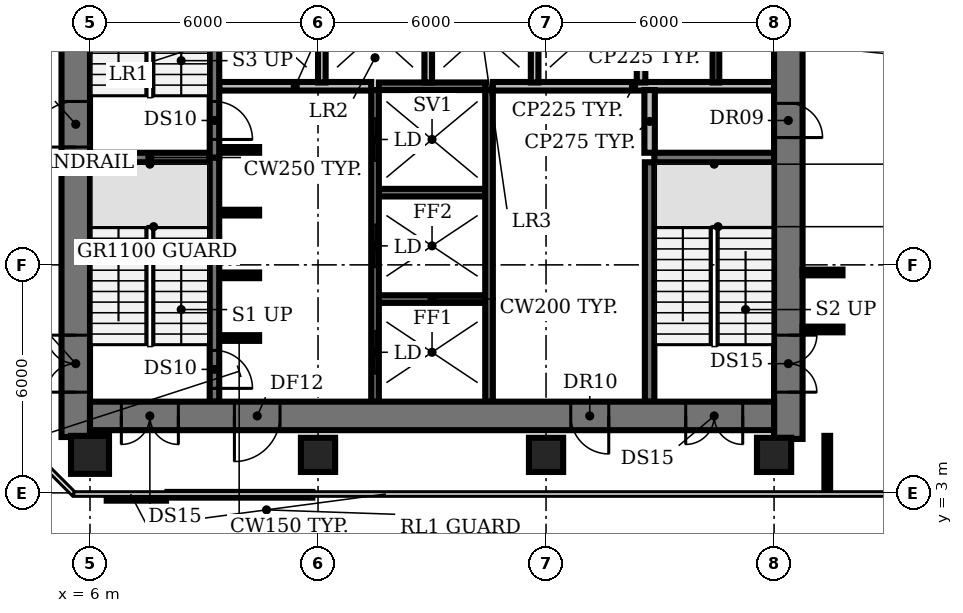
"""IFC4 building model, lengths in metres.
Left out: names, types, materials, properties, quantities, classifications, styles, units other than length and angle.
Written with IfcOpenShell. Run it as: python <this file> out.ifc"""

import sys

from ifc_helpers import new_model, si_unit, direction, frame, frame_2d, origin, origin_2d, place, context, subcontext, project, spatial, rectangle, circle, extrude, element, fill, save


model = new_model("IFC4")
c1 = context("Model", 3, precision=1e-05, world=origin(), true_north=direction((0.0, 1.0)))
c2 = subcontext(c1, "Body", "Model", "MODEL_VIEW")
j1 = project(units=[si_unit("LENGTHUNIT", "METRE"), si_unit("PLANEANGLEUNIT", "RADIAN")], contexts=[c1])
p1 = place(None, origin())
s1 = spatial("IfcSite", under=j1, at=p1, CompositionType="ELEMENT")
p2 = place(p1, origin())
s2 = spatial("IfcBuilding", under=s1, at=p2, CompositionType="ELEMENT")
p3 = place(p2, frame((0.0, 0.0, 96.2)))
s3 = spatial("IfcBuildingStorey", under=s2, at=p3, CompositionType="ELEMENT", Elevation=96.2)
p4 = place(p3, frame((6.0, 4.0, 0.0), z_axis=(0.0, 0.0, 1.0), x_axis=(1.0, 0.0, 0.0)))
e1 = element("IfcColumn", 1, at=p4, inside=s3, PredefinedType="COLUMN", context=c2, shape_type="SweptSolid", body=[
    extrude(circle(Radius=0.5, at=origin_2d()), origin(), (0.0, 0.0, 1.0), 3.85),
])
for number, where, z_axis, x_axis in (
    (2, (12.0, 4.0, 0.0), (0.0, 0.0, 1.0), (1.0, 0.0, 0.0)),
    (3, (18.0, 4.0, 0.0), (0.0, 0.0, 1.0), (1.0, 0.0, 0.0)),
    (4, (24.0, 4.0, 0.0), (0.0, 0.0, 1.0), (1.0, 0.0, 0.0)),
):
    element("IfcColumn", number, at=place(p3, frame(where, z_axis=z_axis, x_axis=x_axis)), inside=s3, PredefinedType="COLUMN", context=c2, shape_type="SweptSolid", body=[
        extrude(rectangle(XDim=0.9, YDim=0.9, at=origin_2d()), origin(), (0.0, 0.0, 1.0), 3.85),
    ])
p5 = place(p3, frame((9.4, 7.075, 0.0), z_axis=(0.0, 0.0, 1.0), x_axis=(1.0, 0.0, 0.0)))
e5 = element("IfcWall", 5, at=p5, inside=s3, PredefinedType="SHEAR", context=c2, shape_type="SweptSolid", body=[
    extrude(rectangle(XDim=1.05, YDim=0.15, at=frame_2d((0.525, 0.0))), origin(), (0.0, 0.0, 1.0), 3.85),
])
p6 = place(p3, frame((13.6, 8.1, 0.0), z_axis=(0.0, 0.0, 1.0), x_axis=(1.0, 0.0, 0.0)))
e6 = element("IfcWall", 6, at=p6, inside=s3, PredefinedType="SHEAR", context=c2, shape_type="SweptSolid", body=[
    extrude(rectangle(XDim=2.8, YDim=0.2, at=frame_2d((1.4, 0.0))), origin(), (0.0, 0.0, 1.0), 3.85),
])
for number, where, z_axis, x_axis in (
    (7, (9.4, 8.725, 0.0), (0.0, 0.0, 1.0), (1.0, 0.0, 0.0)),
    (8, (9.4, 10.375, 0.0), (0.0, 0.0, 1.0), (1.0, 0.0, 0.0)),
):
    element("IfcWall", number, at=place(p3, frame(where, z_axis=z_axis, x_axis=x_axis)), inside=s3, PredefinedType="SHEAR", context=c2, shape_type="SweptSolid", body=[
        extrude(rectangle(XDim=1.05, YDim=0.15, at=frame_2d((0.525, 0.0))), origin(), (0.0, 0.0, 1.0), 3.85),
    ])
p7 = place(p3, frame((13.6, 10.9, 0.0), z_axis=(0.0, 0.0, 1.0), x_axis=(1.0, 0.0, 0.0)))
e9 = element("IfcWall", 9, at=p7, inside=s3, PredefinedType="SHEAR", context=c2, shape_type="SweptSolid", body=[
    extrude(rectangle(XDim=2.8, YDim=0.2, at=frame_2d((1.4, 0.0))), origin(), (0.0, 0.0, 1.0), 3.85),
])
for number, where, z_axis, x_axis in (
    (10, (6.0, 11.825, 0.0), (0.0, 0.0, 1.0), (1.0, 0.0, 0.0)),
    (11, (20.85, 11.825, 0.0), (0.0, 0.0, 1.0), (1.0, 0.0, 0.0)),
):
    element("IfcWall", number, at=place(p3, frame(where, z_axis=z_axis, x_axis=x_axis)), inside=s3, PredefinedType="SHEAR", context=c2, shape_type="SweptSolid", body=[
        extrude(rectangle(XDim=3.15, YDim=0.25, at=frame_2d((1.575, 0.0))), origin(), (0.0, 0.0, 1.0), 3.85),
    ])
p8 = place(p3, frame((9.4, 12.025, 0.0), z_axis=(0.0, 0.0, 1.0), x_axis=(1.0, 0.0, 0.0)))
e12 = element("IfcWall", 12, at=p8, inside=s3, PredefinedType="SHEAR", context=c2, shape_type="SweptSolid", body=[
    extrude(rectangle(XDim=1.05, YDim=0.15, at=frame_2d((0.525, 0.0))), origin(), (0.0, 0.0, 1.0), 3.85),
])
p9 = place(p3, frame((9.4, 13.7, 0.0), z_axis=(0.0, 0.0, 1.0), x_axis=(1.0, 0.0, 0.0)))
e13 = element("IfcWall", 13, at=p9, inside=s3, PredefinedType="PARTITIONING", context=c2, shape_type="SweptSolid", body=[
    extrude(rectangle(XDim=4.0, YDim=0.225, at=frame_2d((2.0, 0.0))), origin(), (0.0, 0.0, 1.0), 3.85),
])
p10 = place(p3, frame((13.6, 13.7, 0.0), z_axis=(0.0, 0.0, 1.0), x_axis=(1.0, 0.0, 0.0)))
e14 = element("IfcWall", 14, at=p10, inside=s3, PredefinedType="SHEAR", context=c2, shape_type="SweptSolid", body=[
    extrude(rectangle(XDim=2.8, YDim=0.2, at=frame_2d((1.4, 0.0))), origin(), (0.0, 0.0, 1.0), 3.85),
])
p11 = place(p3, frame((16.6, 13.7, 0.0), z_axis=(0.0, 0.0, 1.0), x_axis=(1.0, 0.0, 0.0)))
e15 = element("IfcWall", 15, at=p11, inside=s3, PredefinedType="PARTITIONING", context=c2, shape_type="SweptSolid", body=[
    extrude(rectangle(XDim=7.4, YDim=0.225, at=frame_2d((3.7, 0.0))), origin(), (0.0, 0.0, 1.0), 3.85),
])
p12 = place(p3, frame((9.275, 11.825, 0.0), z_axis=(0.0, 0.0, 1.0), x_axis=(0.0, -1.0, 0.0)))
e16 = element("IfcWall", 16, at=p12, inside=s3, PredefinedType="SHEAR", context=c2, shape_type="SweptSolid", body=[
    extrude(rectangle(XDim=6.425, YDim=0.25, at=frame_2d((3.212, 0.0))), origin(), (0.0, 0.0, 1.0), 3.85),
])
p13 = place(p12, frame((5.075, 0.0, 0.0)))
e17 = element("IfcOpeningElement", 17, at=p13, cuts=e16, PredefinedType="OPENING", context=c2, shape_type="SweptSolid", body=[
    extrude(rectangle(XDim=1.0, YDim=2.1, at=frame_2d((0.5, 1.05))), frame((0.0, 0.135, 0.0), z_axis=(0.0, -1.0, 0.0), x_axis=(1.0, 0.0, 0.0)), (0.0, 0.0, 1.0), 0.27),
])
p14 = place(p3, frame((9.275, 18.375, 0.0), z_axis=(0.0, 0.0, 1.0), x_axis=(0.0, -1.0, 0.0)))
e18 = element("IfcWall", 18, at=p14, inside=s3, PredefinedType="SHEAR", context=c2, shape_type="SweptSolid", body=[
    extrude(rectangle(XDim=6.55, YDim=0.25, at=frame_2d((3.275, 0.0))), origin(), (0.0, 0.0, 1.0), 3.85),
])
p15 = place(p14, frame((5.075, 0.0, 0.0)))
e19 = element("IfcOpeningElement", 19, at=p15, cuts=e18, PredefinedType="OPENING", context=c2, shape_type="SweptSolid", body=[
    extrude(rectangle(XDim=1.0, YDim=2.1, at=frame_2d((0.5, 1.05))), frame((0.0, 0.135, 0.0), z_axis=(0.0, -1.0, 0.0), x_axis=(1.0, 0.0, 0.0)), (0.0, 0.0, 1.0), 0.27),
])
p16 = place(p3, frame((12.1, 13.8, 0.0), z_axis=(0.0, 0.0, 1.0), x_axis=(0.0, 1.0, 0.0)))
e20 = element("IfcWall", 20, at=p16, inside=s3, PredefinedType="SOLIDWALL", context=c2, shape_type="SweptSolid", body=[
    extrude(rectangle(XDim=2.6, YDim=0.2, at=frame_2d((1.3, 0.0))), origin(), (0.0, 0.0, 1.0), 3.85),
])
p17 = place(p3, frame((13.5, 5.4, 0.0), z_axis=(0.0, 0.0, 1.0), x_axis=(0.0, 1.0, 0.0)))
e21 = element("IfcWall", 21, at=p17, inside=s3, PredefinedType="SHEAR", context=c2, shape_type="SweptSolid", body=[
    extrude(rectangle(XDim=8.2, YDim=0.2, at=frame_2d((4.1, 0.0))), origin(), (0.0, 0.0, 1.0), 3.85),
])
p18 = place(p17, frame((0.75, 0.0, 0.0)))
e22 = element("IfcOpeningElement", 22, at=p18, cuts=e21, PredefinedType="OPENING", context=c2, shape_type="SweptSolid", body=[
    extrude(rectangle(XDim=1.1, YDim=2.1, at=frame_2d((0.55, 1.05))), frame((0.0, 0.11, 0.0), z_axis=(0.0, -1.0, 0.0), x_axis=(1.0, 0.0, 0.0)), (0.0, 0.0, 1.0), 0.22),
])
p19 = place(p17, frame((3.55, 0.0, 0.0)))
e23 = element("IfcOpeningElement", 23, at=p19, cuts=e21, PredefinedType="OPENING", context=c2, shape_type="SweptSolid", body=[
    extrude(rectangle(XDim=1.1, YDim=2.1, at=frame_2d((0.55, 1.05))), frame((0.0, 0.11, 0.0), z_axis=(0.0, -1.0, 0.0), x_axis=(1.0, 0.0, 0.0)), (0.0, 0.0, 1.0), 0.22),
])
p20 = place(p17, frame((6.35, 0.0, 0.0)))
e24 = element("IfcOpeningElement", 24, at=p20, cuts=e21, PredefinedType="OPENING", context=c2, shape_type="SweptSolid", body=[
    extrude(rectangle(XDim=1.1, YDim=2.1, at=frame_2d((0.55, 1.05))), frame((0.0, 0.11, 0.0), z_axis=(0.0, -1.0, 0.0), x_axis=(1.0, 0.0, 0.0)), (0.0, 0.0, 1.0), 0.22),
])
p21 = place(p3, frame((14.9, 13.8, 0.0), z_axis=(0.0, 0.0, 1.0), x_axis=(0.0, 1.0, 0.0)))
e25 = element("IfcWall", 25, at=p21, inside=s3, PredefinedType="SOLIDWALL", context=c2, shape_type="SweptSolid", body=[
    extrude(rectangle(XDim=2.6, YDim=0.2, at=frame_2d((1.3, 0.0))), origin(), (0.0, 0.0, 1.0), 3.85),
])
p22 = place(p3, frame((16.5, 5.4, 0.0), z_axis=(0.0, 0.0, 1.0), x_axis=(0.0, 1.0, 0.0)))
e26 = element("IfcWall", 26, at=p22, inside=s3, PredefinedType="SHEAR", context=c2, shape_type="SweptSolid", body=[
    extrude(rectangle(XDim=8.2, YDim=0.2, at=frame_2d((4.1, 0.0))), origin(), (0.0, 0.0, 1.0), 3.85),
])
p23 = place(p3, frame((17.7, 13.8, 0.0), z_axis=(0.0, 0.0, 1.0), x_axis=(0.0, 1.0, 0.0)))
e27 = element("IfcWall", 27, at=p23, inside=s3, PredefinedType="SOLIDWALL", context=c2, shape_type="SweptSolid", body=[
    extrude(rectangle(XDim=2.6, YDim=0.2, at=frame_2d((1.3, 0.0))), origin(), (0.0, 0.0, 1.0), 3.85),
])
p24 = place(p3, frame((20.5, 13.8, 0.0), z_axis=(0.0, 0.0, 1.0), x_axis=(0.0, 1.0, 0.0)))
e28 = element("IfcWall", 28, at=p24, inside=s3, PredefinedType="PARTITIONING", context=c2, shape_type="SweptSolid", body=[
    extrude(rectangle(XDim=2.6, YDim=0.225, at=frame_2d((1.3, 0.0))), origin(), (0.0, 0.0, 1.0), 3.85),
])
p25 = place(p3, frame((20.725, 5.4, 0.0), z_axis=(0.0, 0.0, 1.0), x_axis=(0.0, 1.0, 0.0)))
e29 = element("IfcWall", 29, at=p25, inside=s3, PredefinedType="SHEAR", context=c2, shape_type="SweptSolid", body=[
    extrude(rectangle(XDim=6.3, YDim=0.25, at=frame_2d((3.15, 0.0))), origin(), (0.0, 0.0, 1.0), 3.85),
])
p26 = place(p3, frame((20.725, 11.95, 0.0), z_axis=(0.0, 0.0, 1.0), x_axis=(0.0, 1.0, 0.0)))
e30 = element("IfcWall", 30, at=p26, inside=s3, PredefinedType="PARTITIONING", context=c2, shape_type="SweptSolid", body=[
    extrude(rectangle(XDim=1.65, YDim=0.275, at=frame_2d((0.825, 0.0))), origin(), (0.0, 0.0, 1.0), 3.85),
])
p27 = place(p3, frame((22.47, 13.8, 0.0), z_axis=(0.0, 0.0, 1.0), x_axis=(0.0, 1.0, 0.0)))
e31 = element("IfcWall", 31, at=p27, inside=s3, PredefinedType="PARTITIONING", context=c2, shape_type="SweptSolid", body=[
    extrude(rectangle(XDim=2.6, YDim=0.175, at=frame_2d((1.3, 0.0))), origin(), (0.0, 0.0, 1.0), 3.85),
])
p28 = place(p3, frame((5.625, 4.47, 0.0), z_axis=(0.0, 0.0, 1.0), x_axis=(0.0, 1.0, 0.0)))
e32 = element("IfcWall", 32, at=p28, inside=s3, PredefinedType="SHEAR", context=c2, shape_type="SweptSolid", body=[
    extrude(rectangle(XDim=21.08, YDim=0.75, at=frame_2d((10.54, 0.0))), origin(), (0.0, 0.0, 1.0), 3.85),
])
p29 = place(p28, frame((1.18, 0.0, 0.0)))
e33 = element("IfcOpeningElement", 33, at=p29, cuts=e32, PredefinedType="OPENING", context=c2, shape_type="SweptSolid", body=[
    extrude(rectangle(XDim=1.5, YDim=2.1, at=frame_2d((0.75, 1.05))), frame((0.0, 0.385, 0.0), z_axis=(0.0, -1.0, 0.0), x_axis=(1.0, 0.0, 0.0)), (0.0, 0.0, 1.0), 0.77),
])
p30 = place(p28, frame((7.63, 0.0, 0.0)))
e34 = element("IfcOpeningElement", 34, at=p30, cuts=e32, PredefinedType="OPENING", context=c2, shape_type="SweptSolid", body=[
    extrude(rectangle(XDim=1.2, YDim=2.1, at=frame_2d((0.6, 1.05))), frame((0.0, 0.385, 0.0), z_axis=(0.0, -1.0, 0.0), x_axis=(1.0, 0.0, 0.0)), (0.0, 0.0, 1.0), 0.77),
])
p31 = place(p28, frame((14.18, 0.0, 0.0)))
e35 = element("IfcOpeningElement", 35, at=p31, cuts=e32, PredefinedType="OPENING", context=c2, shape_type="SweptSolid", body=[
    extrude(rectangle(XDim=1.2, YDim=2.1, at=frame_2d((0.6, 1.05))), frame((0.0, 0.385, 0.0), z_axis=(0.0, -1.0, 0.0), x_axis=(1.0, 0.0, 0.0)), (0.0, 0.0, 1.0), 0.77),
])
p32 = place(p3, frame((24.375, 25.55, 0.0), z_axis=(0.0, 0.0, 1.0), x_axis=(0.0, -1.0, 0.0)))
e36 = element("IfcWall", 36, at=p32, inside=s3, PredefinedType="SHEAR", context=c2, shape_type="SweptSolid", body=[
    extrude(rectangle(XDim=21.13, YDim=0.75, at=frame_2d((10.565, 0.0))), origin(), (0.0, 0.0, 1.0), 3.85),
])
p33 = place(p32, frame((18.4, 0.0, 0.0)))
e37 = element("IfcOpeningElement", 37, at=p33, cuts=e36, PredefinedType="OPENING", context=c2, shape_type="SweptSolid", body=[
    extrude(rectangle(XDim=1.5, YDim=2.1, at=frame_2d((0.75, 1.05))), frame((0.0, 0.385, 0.0), z_axis=(0.0, -1.0, 0.0), x_axis=(1.0, 0.0, 0.0)), (0.0, 0.0, 1.0), 0.77),
])
p34 = place(p32, frame((12.3, 0.0, 0.0)))
e38 = element("IfcOpeningElement", 38, at=p34, cuts=e36, PredefinedType="OPENING", context=c2, shape_type="SweptSolid", body=[
    extrude(rectangle(XDim=0.9, YDim=2.1, at=frame_2d((0.45, 1.05))), frame((0.0, 0.385, 0.0), z_axis=(0.0, -1.0, 0.0), x_axis=(1.0, 0.0, 0.0)), (0.0, 0.0, 1.0), 0.77),
])
p35 = place(p32, frame((6.3, 0.0, 0.0)))
e39 = element("IfcOpeningElement", 39, at=p35, cuts=e36, PredefinedType="OPENING", context=c2, shape_type="SweptSolid", body=[
    extrude(rectangle(XDim=2.0, YDim=2.1, at=frame_2d((1.0, 1.05))), frame((0.0, 0.385, 0.0), z_axis=(0.0, -1.0, 0.0), x_axis=(1.0, 0.0, 0.0)), (0.0, 0.0, 1.0), 0.77),
])
p36 = place(p3, frame((24.0, 5.025, 0.0), z_axis=(0.0, 0.0, 1.0), x_axis=(-1.0, 0.0, 0.0)))
e40 = element("IfcWall", 40, at=p36, inside=s3, PredefinedType="SHEAR", context=c2, shape_type="SweptSolid", body=[
    extrude(rectangle(XDim=18.0, YDim=0.75, at=frame_2d((9.0, 0.0))), origin(), (0.0, 0.0, 1.0), 3.85),
])
p37 = place(p36, frame((0.825, 0.0, 0.0)))
e41 = element("IfcOpeningElement", 41, at=p37, cuts=e40, PredefinedType="OPENING", context=c2, shape_type="SweptSolid", body=[
    extrude(rectangle(XDim=1.5, YDim=2.1, at=frame_2d((0.75, 1.05))), frame((0.0, 0.385, 0.0), z_axis=(0.0, -1.0, 0.0), x_axis=(1.0, 0.0, 0.0)), (0.0, 0.0, 1.0), 0.77),
])
p38 = place(p36, frame((15.675, 0.0, 0.0)))
e42 = element("IfcOpeningElement", 42, at=p38, cuts=e40, PredefinedType="OPENING", context=c2, shape_type="SweptSolid", body=[
    extrude(rectangle(XDim=1.5, YDim=2.1, at=frame_2d((0.75, 1.05))), frame((0.0, 0.385, 0.0), z_axis=(0.0, -1.0, 0.0), x_axis=(1.0, 0.0, 0.0)), (0.0, 0.0, 1.0), 0.77),
])
p39 = place(p36, frame((13.0, 0.0, 0.0)))
e43 = element("IfcOpeningElement", 43, at=p39, cuts=e40, PredefinedType="OPENING", context=c2, shape_type="SweptSolid", body=[
    extrude(rectangle(XDim=1.2, YDim=2.1, at=frame_2d((0.6, 1.05))), frame((0.0, 0.385, 0.0), z_axis=(0.0, -1.0, 0.0), x_axis=(1.0, 0.0, 0.0)), (0.0, 0.0, 1.0), 0.77),
])
p40 = place(p36, frame((4.35, 0.0, 0.0)))
e44 = element("IfcOpeningElement", 44, at=p40, cuts=e40, PredefinedType="OPENING", context=c2, shape_type="SweptSolid", body=[
    extrude(rectangle(XDim=1.0, YDim=2.1, at=frame_2d((0.5, 1.05))), frame((0.0, 0.385, 0.0), z_axis=(0.0, -1.0, 0.0), x_axis=(1.0, 0.0, 0.0)), (0.0, 0.0, 1.0), 0.77),
])
p41 = place(p3, frame((6.44, 2.87, 0.0), z_axis=(0.0, 0.0, 1.0), x_axis=(1.0, 0.0, 0.0)))
e45 = element("IfcWall", 45, at=p41, inside=s3, PredefinedType="PARTITIONING", context=c2, shape_type="SweptSolid", body=[
    extrude(rectangle(XDim=1.56, YDim=0.15, at=frame_2d((0.78, 0.0))), origin(), (0.0, 0.0, 1.0), 2.83),
])
p42 = place(p3, frame((8.04, 2.95, 0.0), z_axis=(0.0, 0.0, 1.0), x_axis=(1.0, 0.0, 0.0)))
e46 = element("IfcWall", 46, at=p42, inside=s3, PredefinedType="PARTITIONING", context=c2, shape_type="SweptSolid", body=[
    extrude(rectangle(XDim=3.81, YDim=0.15, at=frame_2d((1.905, 0.0))), origin(), (0.0, 0.0, 1.0), 2.83),
])
for number, where, z_axis, x_axis in (
    (47, (24.75, 7.3, 0.0), (0.0, 0.0, 1.0), (1.0, 0.0, 0.0)),
    (48, (24.75, 8.8, 0.0), (0.0, 0.0, 1.0), (1.0, 0.0, 0.0)),
):
    element("IfcWall", number, at=place(p3, frame(where, z_axis=z_axis, x_axis=x_axis)), inside=s3, PredefinedType="PARTITIONING", context=c2, shape_type="SweptSolid", body=[
        extrude(rectangle(XDim=1.05, YDim=0.15, at=frame_2d((0.525, 0.0))), origin(), (0.0, 0.0, 1.0), 2.83),
    ])
p43 = place(p3, frame((25.4, 3.02, 0.0), z_axis=(0.0, 0.0, 1.0), x_axis=(0.0, 1.0, 0.0)))
e49 = element("IfcWall", 49, at=p43, inside=s3, PredefinedType="PARTITIONING", context=c2, shape_type="SweptSolid", body=[
    extrude(rectangle(XDim=1.48, YDim=0.15, at=frame_2d((0.74, 0.0))), origin(), (0.0, 0.0, 1.0), 2.83),
])
p44 = place(p13, origin())
e50 = element("IfcDoor", 50, at=p44, inside=s3, OperationType="SINGLE_SWING_RIGHT", PredefinedType="DOOR", context=c2, shape_type="SweptSolid", body=[
    extrude(rectangle(XDim=1.0, YDim=2.1, at=frame_2d((0.5, 1.05))), frame((0.0, 0.025, 0.0), z_axis=(0.0, -1.0, 0.0), x_axis=(1.0, 0.0, 0.0)), (0.0, 0.0, 1.0), 0.05),
])
fill(e17, e50)
p45 = place(p15, origin())
e51 = element("IfcDoor", 51, at=p45, inside=s3, OperationType="SINGLE_SWING_RIGHT", PredefinedType="DOOR", context=c2, shape_type="SweptSolid", body=[
    extrude(rectangle(XDim=1.0, YDim=2.1, at=frame_2d((0.5, 1.05))), frame((0.0, 0.025, 0.0), z_axis=(0.0, -1.0, 0.0), x_axis=(1.0, 0.0, 0.0)), (0.0, 0.0, 1.0), 0.05),
])
fill(e19, e51)
p46 = place(p18, origin())
e52 = element("IfcDoor", 52, at=p46, inside=s3, OperationType="DOUBLE_DOOR_SLIDING", PredefinedType="DOOR", context=c2, shape_type="SweptSolid", body=[
    extrude(rectangle(XDim=1.1, YDim=2.1, at=frame_2d((0.55, 1.05))), frame((0.0, 0.025, 0.0), z_axis=(0.0, -1.0, 0.0), x_axis=(1.0, 0.0, 0.0)), (0.0, 0.0, 1.0), 0.05),
])
fill(e22, e52)
p47 = place(p19, origin())
e53 = element("IfcDoor", 53, at=p47, inside=s3, OperationType="DOUBLE_DOOR_SLIDING", PredefinedType="DOOR", context=c2, shape_type="SweptSolid", body=[
    extrude(rectangle(XDim=1.1, YDim=2.1, at=frame_2d((0.55, 1.05))), frame((0.0, 0.025, 0.0), z_axis=(0.0, -1.0, 0.0), x_axis=(1.0, 0.0, 0.0)), (0.0, 0.0, 1.0), 0.05),
])
fill(e23, e53)
p48 = place(p20, origin())
e54 = element("IfcDoor", 54, at=p48, inside=s3, OperationType="DOUBLE_DOOR_SLIDING", PredefinedType="DOOR", context=c2, shape_type="SweptSolid", body=[
    extrude(rectangle(XDim=1.1, YDim=2.1, at=frame_2d((0.55, 1.05))), frame((0.0, 0.025, 0.0), z_axis=(0.0, -1.0, 0.0), x_axis=(1.0, 0.0, 0.0)), (0.0, 0.0, 1.0), 0.05),
])
fill(e24, e54)
p49 = place(p29, origin())
e55 = element("IfcDoor", 55, at=p49, inside=s3, OperationType="DOUBLE_DOOR_SINGLE_SWING", PredefinedType="DOOR", context=c2, shape_type="SweptSolid", body=[
    extrude(rectangle(XDim=1.5, YDim=2.1, at=frame_2d((0.75, 1.05))), frame((0.0, 0.025, 0.0), z_axis=(0.0, -1.0, 0.0), x_axis=(1.0, 0.0, 0.0)), (0.0, 0.0, 1.0), 0.05),
])
fill(e33, e55)
p50 = place(p30, origin())
e56 = element("IfcDoor", 56, at=p50, inside=s3, OperationType="SINGLE_SWING_LEFT", PredefinedType="DOOR", context=c2, shape_type="SweptSolid", body=[
    extrude(rectangle(XDim=1.2, YDim=2.1, at=frame_2d((0.6, 1.05))), frame((0.0, 0.025, 0.0), z_axis=(0.0, -1.0, 0.0), x_axis=(1.0, 0.0, 0.0)), (0.0, 0.0, 1.0), 0.05),
])
fill(e34, e56)
p51 = place(p33, origin())
e57 = element("IfcDoor", 57, at=p51, inside=s3, OperationType="DOUBLE_DOOR_SINGLE_SWING", PredefinedType="DOOR", context=c2, shape_type="SweptSolid", body=[
    extrude(rectangle(XDim=1.5, YDim=2.1, at=frame_2d((0.75, 1.05))), frame((0.0, 0.025, 0.0), z_axis=(0.0, -1.0, 0.0), x_axis=(1.0, 0.0, 0.0)), (0.0, 0.0, 1.0), 0.05),
])
fill(e37, e57)
p52 = place(p34, origin())
e58 = element("IfcDoor", 58, at=p52, inside=s3, OperationType="SINGLE_SWING_RIGHT", PredefinedType="DOOR", context=c2, shape_type="SweptSolid", body=[
    extrude(rectangle(XDim=0.9, YDim=2.1, at=frame_2d((0.45, 1.05))), frame((0.0, -0.315, 0.0), z_axis=(0.0, -1.0, 0.0), x_axis=(1.0, 0.0, 0.0)), (0.0, 0.0, 1.0), 0.05),
])
fill(e38, e58)
p53 = place(p37, origin())
e59 = element("IfcDoor", 59, at=p53, inside=s3, OperationType="DOUBLE_DOOR_SINGLE_SWING", PredefinedType="DOOR", context=c2, shape_type="SweptSolid", body=[
    extrude(rectangle(XDim=1.5, YDim=2.1, at=frame_2d((0.75, 1.05))), frame((0.0, 0.025, 0.0), z_axis=(0.0, -1.0, 0.0), x_axis=(1.0, 0.0, 0.0)), (0.0, 0.0, 1.0), 0.05),
])
fill(e41, e59)
p54 = place(p38, origin())
e60 = element("IfcDoor", 60, at=p54, inside=s3, OperationType="DOUBLE_DOOR_SINGLE_SWING", PredefinedType="DOOR", context=c2, shape_type="SweptSolid", body=[
    extrude(rectangle(XDim=1.5, YDim=2.1, at=frame_2d((0.75, 1.05))), frame((0.0, 0.025, 0.0), z_axis=(0.0, -1.0, 0.0), x_axis=(1.0, 0.0, 0.0)), (0.0, 0.0, 1.0), 0.05),
])
fill(e42, e60)
p55 = place(p39, origin())
e61 = element("IfcDoor", 61, at=p55, inside=s3, OperationType="SINGLE_SWING_RIGHT", PredefinedType="DOOR", context=c2, shape_type="SweptSolid", body=[
    extrude(rectangle(XDim=1.2, YDim=2.1, at=frame_2d((0.6, 1.05))), frame((0.0, 0.025, 0.0), z_axis=(0.0, -1.0, 0.0), x_axis=(1.0, 0.0, 0.0)), (0.0, 0.0, 1.0), 0.05),
])
fill(e43, e61)
p56 = place(p40, origin())
e62 = element("IfcDoor", 62, at=p56, inside=s3, OperationType="SINGLE_SWING_LEFT", PredefinedType="DOOR", context=c2, shape_type="SweptSolid", body=[
    extrude(rectangle(XDim=1.0, YDim=2.1, at=frame_2d((0.5, 1.05))), frame((0.0, -0.315, 0.0), z_axis=(0.0, -1.0, 0.0), x_axis=(1.0, 0.0, 0.0)), (0.0, 0.0, 1.0), 0.05),
])
fill(e44, e62)
save(model, sys.argv[1])
